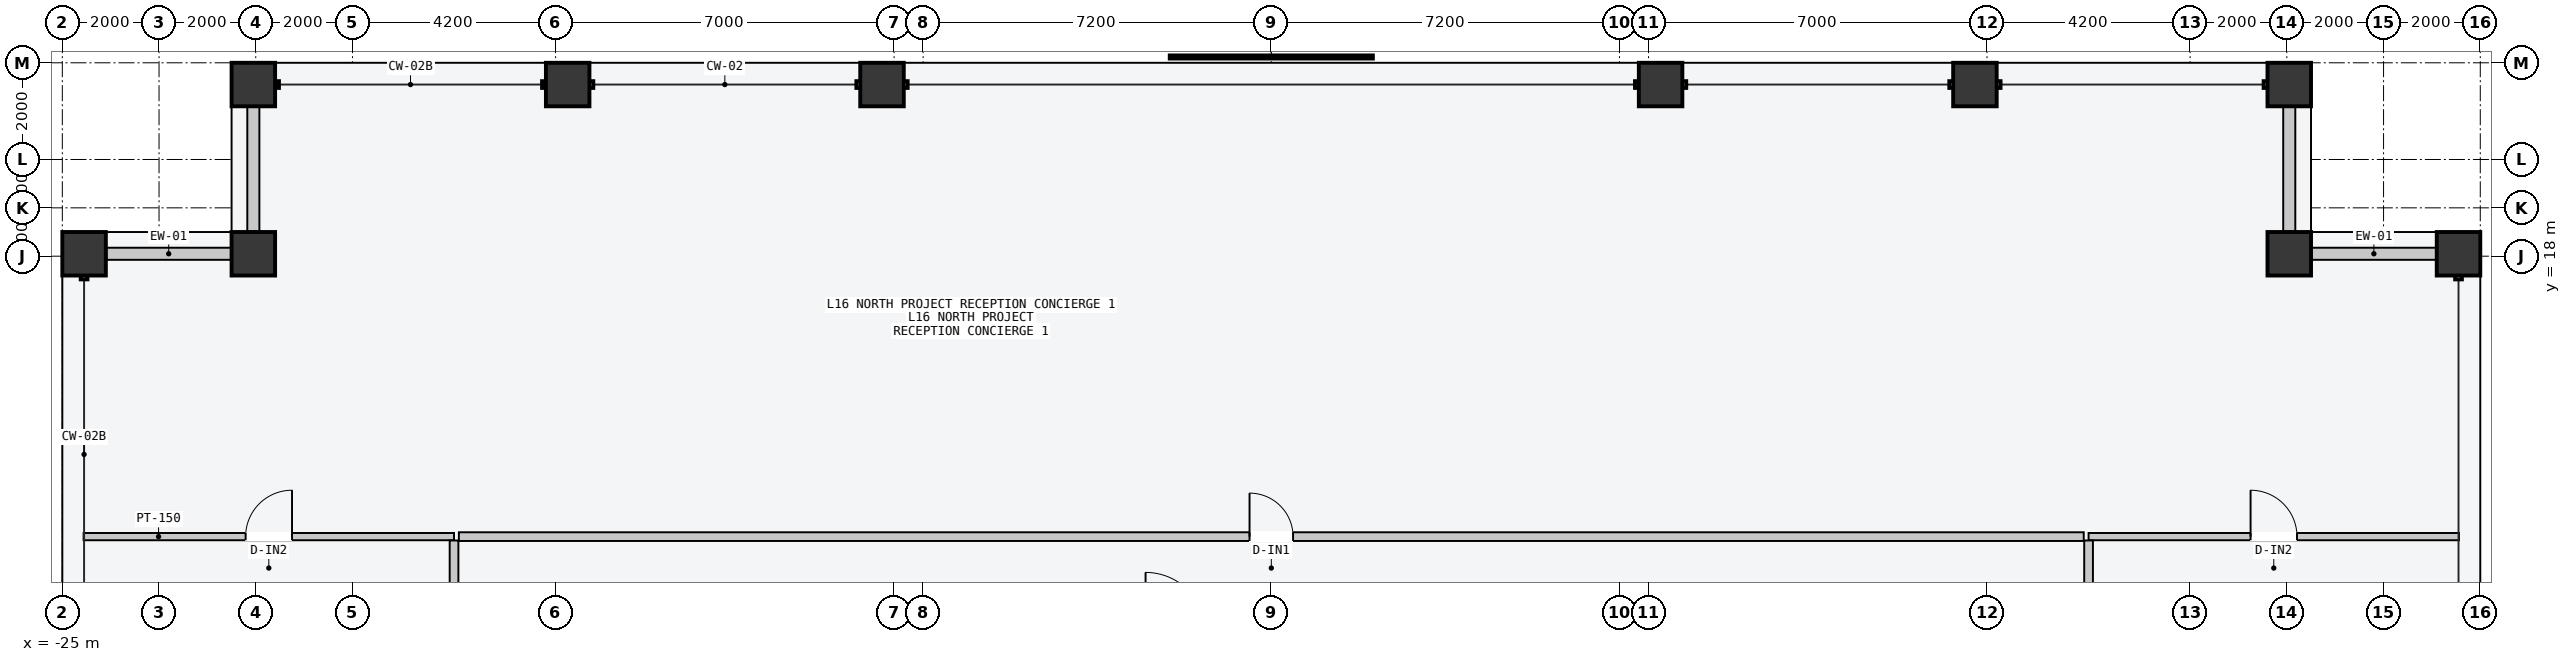
"""IFC4 building model, lengths in metres.
Left out: names, types, materials, properties, quantities, classifications, styles, units other than length and angle.
Written with IfcOpenShell. Run it as: python <this file> out.ifc"""

import sys

from ifc_helpers import new_model, si_unit, direction, frame, frame_2d, origin, origin_2d, place, context, subcontext, project, spatial, rectangle, hollow_rectangle, extrude, element, fill, save


model = new_model("IFC4")
c1 = context("Model", 3, precision=1e-05, world=origin(), true_north=direction((0.0, 1.0)))
c2 = subcontext(c1, "Body", "Model", "MODEL_VIEW")
j1 = project(units=[si_unit("LENGTHUNIT", "METRE"), si_unit("PLANEANGLEUNIT", "RADIAN")], contexts=[c1])
p1 = place(None, origin())
s1 = spatial("IfcSite", under=j1, at=p1, CompositionType="ELEMENT")
p2 = place(p1, origin())
s2 = spatial("IfcBuilding", under=s1, at=p2, CompositionType="ELEMENT")
p3 = place(p2, frame((0.0, 0.0, 63.6)))
s3 = spatial("IfcBuildingStorey", under=s2, at=p3, CompositionType="ELEMENT", Elevation=63.6)
for number, where, z_axis, x_axis in (
    (1, (-21.05, 21.55, 0.0), (0.0, 0.0, 1.0), (1.0, 0.0, 0.0)),
    (2, (-14.55, 21.55, 0.0), (0.0, 0.0, 1.0), (1.0, 0.0, 0.0)),
    (3, (-8.05, 21.55, 0.0), (0.0, 0.0, 1.0), (1.0, 0.0, 0.0)),
    (4, (8.05, 21.55, 0.0), (0.0, 0.0, 1.0), (1.0, 0.0, 0.0)),
    (5, (14.55, 21.55, 0.0), (0.0, 0.0, 1.0), (1.0, 0.0, 0.0)),
    (6, (21.05, 21.55, 0.0), (0.0, 0.0, 1.0), (1.0, 0.0, 0.0)),
    (7, (-24.55, 18.05, 0.0), (0.0, 0.0, 1.0), (0.0, 1.0, 0.0)),
    (8, (24.55, 18.05, 0.0), (0.0, 0.0, 1.0), (0.0, 1.0, 0.0)),
    (9, (-21.05, 18.05, 0.0), (0.0, 0.0, 1.0), (1.0, 0.0, 0.0)),
    (10, (21.05, 18.05, 0.0), (0.0, 0.0, 1.0), (1.0, 0.0, 0.0)),
):
    element("IfcColumn", number, at=place(p3, frame(where, z_axis=z_axis, x_axis=x_axis)), inside=s3, PredefinedType="COLUMN", context=c2, shape_type="SweptSolid", body=[
        extrude(hollow_rectangle(XDim=0.9, YDim=0.9, WallThickness=0.045, at=origin_2d()), origin(), (0.0, 0.0, 1.0), 3.6),
    ])
for number, where, z_axis, x_axis in (
    (11, (-24.09, 18.05, 0.0), (0.0, 0.0, 1.0), (1.0, 0.0, 0.0)),
    (12, (-21.05, 18.51, 0.0), (0.0, 0.0, 1.0), (0.0, 1.0, 0.0)),
    (13, (21.51, 18.05, 0.0), (0.0, 0.0, 1.0), (1.0, 0.0, 0.0)),
    (14, (21.05, 18.51, 0.0), (0.0, 0.0, 1.0), (0.0, 1.0, 0.0)),
):
    element("IfcWall", number, at=place(p3, frame(where, z_axis=z_axis, x_axis=x_axis)), inside=s3, PredefinedType="STANDARD", context=c2, shape_type="SweptSolid", body=[
        extrude(rectangle(XDim=2.58, YDim=0.25, at=frame_2d((1.29, 0.0))), origin(), (0.0, 0.0, 1.0), 2.7),
    ])
p4 = place(p3, frame((-16.8, 12.2, 0.0), z_axis=(0.0, 0.0, 1.0), x_axis=(1.0, 0.0, 0.0)))
e15 = element("IfcWall", 15, at=p4, inside=s3, PredefinedType="PARTITIONING", context=c2, shape_type="SweptSolid", body=[
    extrude(rectangle(XDim=33.6, YDim=0.18, at=frame_2d((16.8, 0.0))), origin(), (0.0, 0.0, 1.0), 3.4),
])
p5 = place(p4, frame((16.35, 0.0, 0.0)))
e16 = element("IfcOpeningElement", 16, at=p5, cuts=e15, PredefinedType="OPENING", context=c2, shape_type="SweptSolid", body=[
    extrude(rectangle(XDim=0.9, YDim=2.15, at=frame_2d((0.45, 1.075))), frame((0.0, 0.1, 0.0), z_axis=(0.0, -1.0, 0.0), x_axis=(1.0, 0.0, 0.0)), (0.0, 0.0, 1.0), 0.2),
])
p6 = place(p3, frame((-24.56, 12.2, 0.0), z_axis=(0.0, 0.0, 1.0), x_axis=(1.0, 0.0, 0.0)))
e17 = element("IfcWall", 17, at=p6, inside=s3, PredefinedType="PARTITIONING", context=c2, shape_type="SweptSolid", body=[
    extrude(rectangle(XDim=7.66, YDim=0.15, at=frame_2d((3.83, 0.0))), origin(), (0.0, 0.0, 1.0), 3.4),
])
p7 = place(p6, frame((3.35, 0.0, 0.0)))
e18 = element("IfcOpeningElement", 18, at=p7, cuts=e17, PredefinedType="OPENING", context=c2, shape_type="SweptSolid", body=[
    extrude(rectangle(XDim=0.96, YDim=2.18, at=frame_2d((0.48, 1.09))), frame((0.0, 0.085, 0.0), z_axis=(0.0, -1.0, 0.0), x_axis=(1.0, 0.0, 0.0)), (0.0, 0.0, 1.0), 0.17),
])
p8 = place(p3, frame((16.9, 12.2, 0.0), z_axis=(0.0, 0.0, 1.0), x_axis=(1.0, 0.0, 0.0)))
e19 = element("IfcWall", 19, at=p8, inside=s3, PredefinedType="PARTITIONING", context=c2, shape_type="SweptSolid", body=[
    extrude(rectangle(XDim=7.66, YDim=0.15, at=frame_2d((3.83, 0.0))), origin(), (0.0, 0.0, 1.0), 3.4),
])
p9 = place(p8, frame((3.35, 0.0, 0.0)))
e20 = element("IfcOpeningElement", 20, at=p9, cuts=e19, PredefinedType="OPENING", context=c2, shape_type="SweptSolid", body=[
    extrude(rectangle(XDim=0.96, YDim=2.18, at=frame_2d((0.48, 1.09))), frame((0.0, 0.085, 0.0), z_axis=(0.0, -1.0, 0.0), x_axis=(1.0, 0.0, 0.0)), (0.0, 0.0, 1.0), 0.17),
])
p10 = place(p3, frame((-16.9, -14.42, 0.0), z_axis=(0.0, 0.0, 1.0), x_axis=(0.0, 1.0, 0.0)))
e21 = element("IfcWall", 21, at=p10, inside=s3, PredefinedType="PARTITIONING", context=c2, shape_type="SweptSolid", body=[
    extrude(rectangle(XDim=26.54, YDim=0.18, at=frame_2d((13.27, 0.0))), origin(), (0.0, 0.0, 1.0), 3.4),
])
p11 = place(p10, frame((5.094, 0.0, 0.0)))
e22 = element("IfcOpeningElement", 22, at=p11, cuts=e21, PredefinedType="OPENING", context=c2, shape_type="SweptSolid", body=[
    extrude(rectangle(XDim=0.96, YDim=2.18, at=frame_2d((0.48, 1.09))), frame((0.0, 0.1, 0.0), z_axis=(0.0, -1.0, 0.0), x_axis=(1.0, 0.0, 0.0)), (0.0, 0.0, 1.0), 0.2),
])
p12 = place(p10, frame((18.333, 0.0, 0.0)))
e23 = element("IfcOpeningElement", 23, at=p12, cuts=e21, PredefinedType="OPENING", context=c2, shape_type="SweptSolid", body=[
    extrude(rectangle(XDim=1.02, YDim=2.2, at=frame_2d((0.51, 1.1))), frame((0.0, 0.1, 0.0), z_axis=(0.0, -1.0, 0.0), x_axis=(1.0, 0.0, 0.0)), (0.0, 0.0, 1.0), 0.2),
])
p13 = place(p3, frame((16.9, -14.42, 0.0), z_axis=(0.0, 0.0, 1.0), x_axis=(0.0, 1.0, 0.0)))
e24 = element("IfcWall", 24, at=p13, inside=s3, PredefinedType="PARTITIONING", context=c2, shape_type="SweptSolid", body=[
    extrude(rectangle(XDim=26.54, YDim=0.18, at=frame_2d((13.27, 0.0))), origin(), (0.0, 0.0, 1.0), 3.4),
])
p14 = place(p13, frame((2.572, 0.0, 0.0)))
e25 = element("IfcOpeningElement", 25, at=p14, cuts=e24, PredefinedType="OPENING", context=c2, shape_type="SweptSolid", body=[
    extrude(rectangle(XDim=0.96, YDim=2.18, at=frame_2d((0.48, 1.09))), frame((0.0, 0.1, 0.0), z_axis=(0.0, -1.0, 0.0), x_axis=(1.0, 0.0, 0.0)), (0.0, 0.0, 1.0), 0.2),
])
p15 = place(p13, frame((10.106, 0.0, 0.0)))
e26 = element("IfcOpeningElement", 26, at=p15, cuts=e24, PredefinedType="OPENING", context=c2, shape_type="SweptSolid", body=[
    extrude(rectangle(XDim=1.02, YDim=2.2, at=frame_2d((0.51, 1.1))), frame((0.0, 0.1, 0.0), z_axis=(0.0, -1.0, 0.0), x_axis=(1.0, 0.0, 0.0)), (0.0, 0.0, 1.0), 0.2),
])
p16 = place(p13, frame((20.304, 0.0, 0.0)))
e27 = element("IfcOpeningElement", 27, at=p16, cuts=e24, PredefinedType="OPENING", context=c2, shape_type="SweptSolid", body=[
    extrude(rectangle(XDim=1.06, YDim=2.2, at=frame_2d((0.53, 1.1))), frame((0.0, 0.1, 0.0), z_axis=(0.0, -1.0, 0.0), x_axis=(1.0, 0.0, 0.0)), (0.0, 0.0, 1.0), 0.2),
])
p17 = place(p5, origin())
e28 = element("IfcDoor", 28, at=p17, inside=s3, OperationType="SINGLE_SWING_LEFT", PredefinedType="DOOR", context=c2, shape_type="SweptSolid", body=[
    extrude(rectangle(XDim=0.9, YDim=2.15, at=frame_2d((0.45, 1.075))), frame((0.0, 0.025, 0.0), z_axis=(0.0, -1.0, 0.0), x_axis=(1.0, 0.0, 0.0)), (0.0, 0.0, 1.0), 0.05),
])
fill(e16, e28)
p18 = place(p7, origin())
e29 = element("IfcDoor", 29, at=p18, inside=s3, OperationType="SINGLE_SWING_RIGHT", PredefinedType="DOOR", context=c2, shape_type="SweptSolid", body=[
    extrude(rectangle(XDim=0.96, YDim=2.18, at=frame_2d((0.48, 1.09))), frame((0.0, 0.025, 0.0), z_axis=(0.0, -1.0, 0.0), x_axis=(1.0, 0.0, 0.0)), (0.0, 0.0, 1.0), 0.05),
])
fill(e18, e29)
p19 = place(p9, origin())
e30 = element("IfcDoor", 30, at=p19, inside=s3, OperationType="SINGLE_SWING_LEFT", PredefinedType="DOOR", context=c2, shape_type="SweptSolid", body=[
    extrude(rectangle(XDim=0.96, YDim=2.18, at=frame_2d((0.48, 1.09))), frame((0.0, 0.025, 0.0), z_axis=(0.0, -1.0, 0.0), x_axis=(1.0, 0.0, 0.0)), (0.0, 0.0, 1.0), 0.05),
])
fill(e20, e30)
save(model, sys.argv[1])
